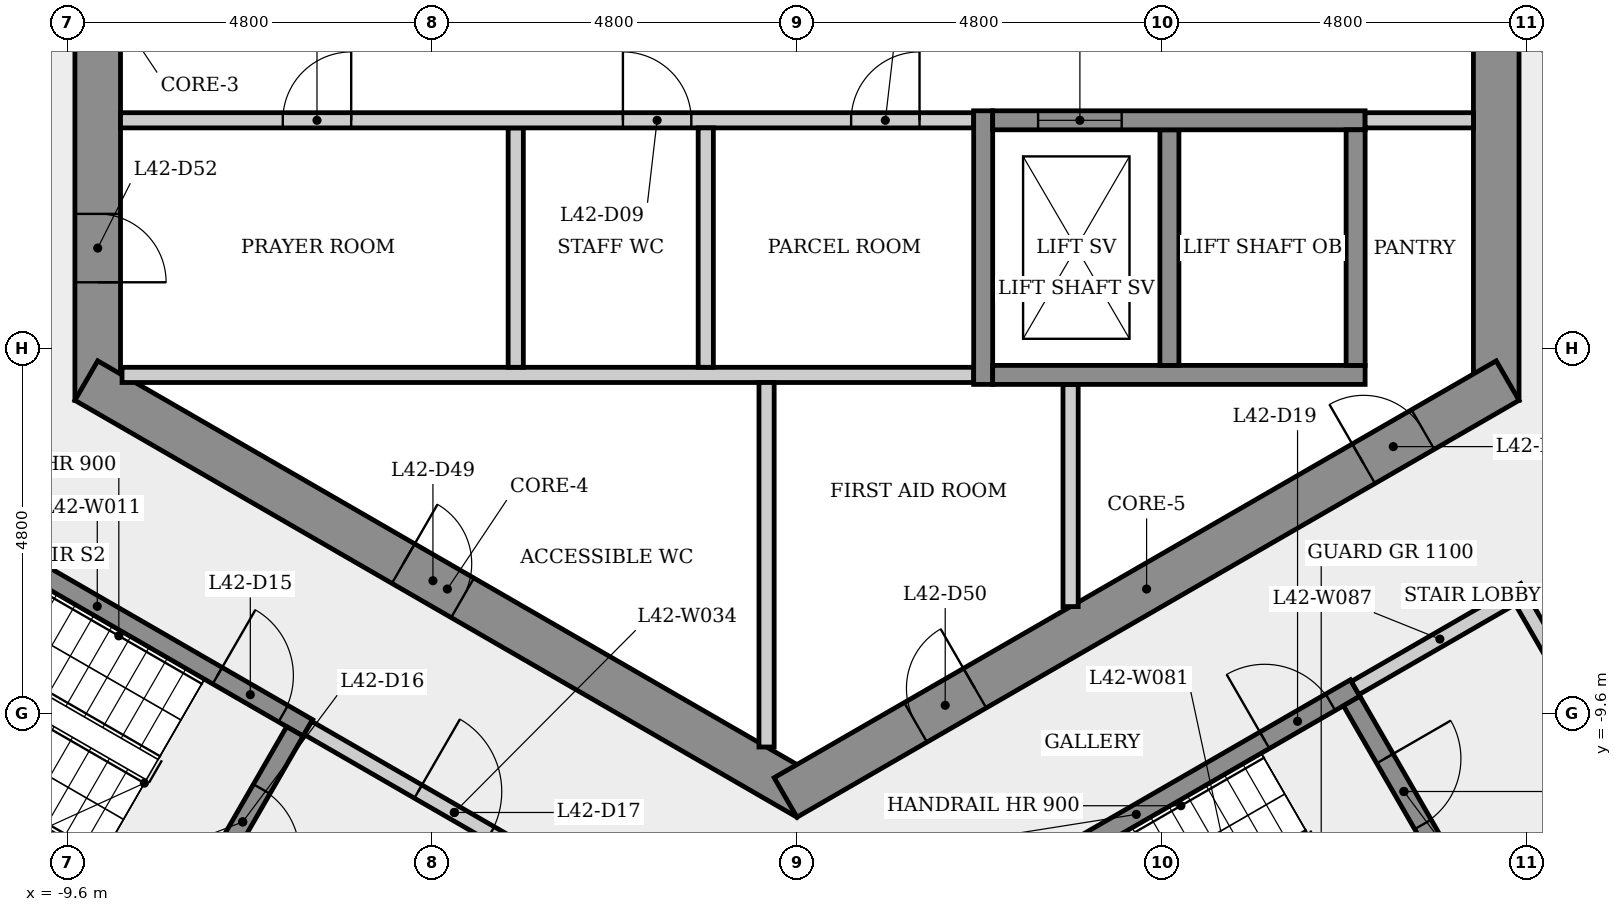
"""IFC4 building model, lengths in metres.
Left out: names, types, materials, properties, quantities, classifications, styles, units other than length and angle.
Written with IfcOpenShell. Run it as: python <this file> out.ifc"""

import sys

from ifc_helpers import new_model, si_unit, direction, frame, frame_2d, origin, place, context, subcontext, project, spatial, rectangle, extrude, element, fill, save


model = new_model("IFC4")
c1 = context("Model", 3, precision=1e-05, world=origin(), true_north=direction((0.0, 1.0)))
c2 = subcontext(c1, "Body", "Model", "MODEL_VIEW")
j1 = project(units=[si_unit("LENGTHUNIT", "METRE"), si_unit("PLANEANGLEUNIT", "RADIAN")], contexts=[c1])
p1 = place(None, origin())
s1 = spatial("IfcSite", under=j1, at=p1, CompositionType="ELEMENT")
p2 = place(p1, origin())
s2 = spatial("IfcBuilding", under=s1, at=p2, CompositionType="ELEMENT")
p3 = place(p2, frame((0.0, 0.0, 159.5)))
s3 = spatial("IfcBuildingStorey", under=s2, at=p3, CompositionType="ELEMENT", Elevation=159.5)
p4 = place(p3, frame((9.2, -5.485, 0.0), z_axis=(0.0, 0.0, 1.0), x_axis=(0.0, 1.0, 0.0)))
e1 = element("IfcWall", 1, at=p4, inside=s3, PredefinedType="SHEAR", context=c2, shape_type="SweptSolid", body=[
    extrude(rectangle(XDim=10.97, YDim=0.6, at=frame_2d((5.485, 0.0))), origin(), (0.0, 0.0, 1.0), 3.4),
])
p5 = place(p4, frame((4.685, 0.0, 0.0)))
e2 = element("IfcOpeningElement", 2, at=p5, cuts=e1, PredefinedType="OPENING", context=c2, shape_type="SweptSolid", body=[
    extrude(rectangle(XDim=1.6, YDim=2.1, at=frame_2d((0.8, 1.05))), frame((0.0, 0.31, 0.0), z_axis=(0.0, -1.0, 0.0), x_axis=(1.0, 0.0, 0.0)), (0.0, 0.0, 1.0), 0.62),
])
p6 = place(p3, frame((-9.2, 5.485, 0.0), z_axis=(0.0, 0.0, 1.0), x_axis=(0.0, -1.0, 0.0)))
e3 = element("IfcWall", 3, at=p6, inside=s3, PredefinedType="SHEAR", context=c2, shape_type="SweptSolid", body=[
    extrude(rectangle(XDim=10.97, YDim=0.6, at=frame_2d((5.485, 0.0))), origin(), (0.0, 0.0, 1.0), 3.4),
])
p7 = place(p6, frame((8.516, 0.0, 0.0)))
e4 = element("IfcOpeningElement", 4, at=p7, cuts=e3, PredefinedType="OPENING", context=c2, shape_type="SweptSolid", body=[
    extrude(rectangle(XDim=0.9, YDim=2.1, at=frame_2d((0.45, 1.05))), frame((0.0, 0.31, 0.0), z_axis=(0.0, -1.0, 0.0), x_axis=(1.0, 0.0, 0.0)), (0.0, 0.0, 1.0), 0.62),
])
p8 = place(p6, frame((4.685, 0.0, 0.0)))
e5 = element("IfcOpeningElement", 5, at=p8, cuts=e3, PredefinedType="OPENING", context=c2, shape_type="SweptSolid", body=[
    extrude(rectangle(XDim=1.6, YDim=2.1, at=frame_2d((0.8, 1.05))), frame((0.0, 0.31, 0.0), z_axis=(0.0, -1.0, 0.0), x_axis=(1.0, 0.0, 0.0)), (0.0, 0.0, 1.0), 0.62),
])
p9 = place(p3, frame((-9.35, -5.225, 0.0), z_axis=(0.0, 0.0, 1.0), x_axis=(0.866023993627, -0.500002442456, 0.0)))
e6 = element("IfcWall", 6, at=p9, inside=s3, PredefinedType="SHEAR", context=c2, shape_type="SweptSolid", body=[
    extrude(rectangle(XDim=10.97, YDim=0.6, at=frame_2d((5.485, 0.0))), origin(), (0.0, 0.0, 1.0), 3.4),
])
p10 = place(p9, frame((4.816, 0.0, 0.0)))
e7 = element("IfcOpeningElement", 7, at=p10, cuts=e6, PredefinedType="OPENING", context=c2, shape_type="SweptSolid", body=[
    extrude(rectangle(XDim=0.9, YDim=2.1, at=frame_2d((0.45, 1.05))), frame((0.0, 0.31, 0.0), z_axis=(0.0, -1.0, 0.0), x_axis=(1.0, 0.0, 0.0)), (0.0, 0.0, 1.0), 0.62),
])
p11 = place(p3, frame((-0.15, -10.71, 0.0), z_axis=(0.0, 0.0, 1.0), x_axis=(0.866023993627, 0.500002442456, 0.0)))
e8 = element("IfcWall", 8, at=p11, inside=s3, PredefinedType="SHEAR", context=c2, shape_type="SweptSolid", body=[
    extrude(rectangle(XDim=10.97, YDim=0.6, at=frame_2d((5.485, 0.0))), origin(), (0.0, 0.0, 1.0), 3.4),
])
p12 = place(p11, frame((1.975, 0.0, 0.0)))
e9 = element("IfcOpeningElement", 9, at=p12, cuts=e8, PredefinedType="OPENING", context=c2, shape_type="SweptSolid", body=[
    extrude(rectangle(XDim=0.9, YDim=2.1, at=frame_2d((0.45, 1.05))), frame((0.0, 0.31, 0.0), z_axis=(0.0, -1.0, 0.0), x_axis=(1.0, 0.0, 0.0)), (0.0, 0.0, 1.0), 0.62),
])
p13 = place(p11, frame((8.782, 0.0, 0.0)))
e10 = element("IfcOpeningElement", 10, at=p13, cuts=e8, PredefinedType="OPENING", context=c2, shape_type="SweptSolid", body=[
    extrude(rectangle(XDim=0.9, YDim=2.1, at=frame_2d((0.45, 1.05))), frame((0.0, 0.31, 0.0), z_axis=(0.0, -1.0, 0.0), x_axis=(1.0, 0.0, 0.0)), (0.0, 0.0, 1.0), 0.62),
])
p14 = place(p3, frame((-11.977, -6.595, 0.0), z_axis=(0.0, 0.0, 1.0), x_axis=(0.866025499775, -0.499999833739, 0.0)))
e11 = element("IfcWall", 11, at=p14, inside=s3, PredefinedType="SHEAR", context=c2, shape_type="SweptSolid", body=[
    extrude(rectangle(XDim=6.4, YDim=0.25, at=frame_2d((3.2, 0.0))), origin(), (0.0, 0.0, 1.0), 3.05),
])
p15 = place(p14, frame((5.025, 0.0, 0.0)))
e12 = element("IfcOpeningElement", 12, at=p15, cuts=e11, PredefinedType="OPENING", context=c2, shape_type="SweptSolid", body=[
    extrude(rectangle(XDim=1.0, YDim=2.1, at=frame_2d((0.5, 1.05))), frame((0.0, 0.135, 0.0), z_axis=(0.0, -1.0, 0.0), x_axis=(1.0, 0.0, 0.0)), (0.0, 0.0, 1.0), 0.27),
])
p16 = place(p3, frame((-13.477, -9.193, 0.0), z_axis=(0.0, 0.0, 1.0), x_axis=(0.866025499775, -0.499999833739, 0.0)))
e13 = element("IfcWall", 13, at=p16, inside=s3, PredefinedType="SHEAR", context=c2, shape_type="SweptSolid", body=[
    extrude(rectangle(XDim=6.4, YDim=0.25, at=frame_2d((3.2, 0.0))), origin(), (0.0, 0.0, 1.0), 3.05),
])
p17 = place(p3, frame((-8.88, -5.15, 0.0), z_axis=(0.0, 0.0, 1.0), x_axis=(1.0, 0.0, 0.0)))
e14 = element("IfcWall", 14, at=p17, inside=s3, PredefinedType="PARTITIONING", context=c2, shape_type="SweptSolid", body=[
    extrude(rectangle(XDim=11.205, YDim=0.2, at=frame_2d((5.603, 0.0))), origin(), (0.0, 0.0, 1.0), 3.05),
])
p18 = place(p3, frame((-6.605, -9.841, 0.0), z_axis=(0.0, 0.0, 1.0), x_axis=(-0.499996545922, -0.866027397988, 0.0)))
e15 = element("IfcWall", 15, at=p18, inside=s3, PredefinedType="SHEAR", context=c2, shape_type="SweptSolid", body=[
    extrude(rectangle(XDim=2.75, YDim=0.25, at=frame_2d((1.375, 0.0))), origin(), (0.0, 0.0, 1.0), 3.05),
])
p19 = place(p18, frame((0.875, 0.0, 0.0)))
e16 = element("IfcOpeningElement", 16, at=p19, cuts=e15, PredefinedType="OPENING", context=c2, shape_type="SweptSolid", body=[
    extrude(rectangle(XDim=1.0, YDim=2.1, at=frame_2d((0.5, 1.05))), frame((0.0, 0.135, 0.0), z_axis=(0.0, -1.0, 0.0), x_axis=(1.0, 0.0, 0.0)), (0.0, 0.0, 1.0), 0.27),
])
p20 = place(p3, frame((-6.435, -9.795, 0.0), z_axis=(0.0, 0.0, 1.0), x_axis=(0.866012907634, -0.500021643343, 0.0)))
e17 = element("IfcWall", 17, at=p20, inside=s3, PredefinedType="PARTITIONING", context=c2, shape_type="SweptSolid", body=[
    extrude(rectangle(XDim=4.45, YDim=0.2, at=frame_2d((2.225, 0.0))), origin(), (0.0, 0.0, 1.0), 3.05),
])
p21 = place(p20, frame((1.675, 0.0, 0.0)))
e18 = element("IfcOpeningElement", 18, at=p21, cuts=e17, PredefinedType="OPENING", context=c2, shape_type="SweptSolid", body=[
    extrude(rectangle(XDim=1.1, YDim=2.1, at=frame_2d((0.55, 1.05))), frame((0.0, 0.11, 0.0), z_axis=(0.0, -1.0, 0.0), x_axis=(1.0, 0.0, 0.0)), (0.0, 0.0, 1.0), 0.22),
])
p22 = place(p3, frame((-3.7, -1.9, 0.0), z_axis=(0.0, 0.0, 1.0), x_axis=(0.0, -1.0, 0.0)))
e19 = element("IfcWall", 19, at=p22, inside=s3, PredefinedType="PARTITIONING", context=c2, shape_type="SweptSolid", body=[
    extrude(rectangle(XDim=3.15, YDim=0.2, at=frame_2d((1.575, 0.0))), origin(), (0.0, 0.0, 1.0), 3.05),
])
p23 = place(p3, frame((-8.9, -1.8, 0.0), z_axis=(0.0, 0.0, 1.0), x_axis=(1.0, 0.0, 0.0)))
e20 = element("IfcWall", 20, at=p23, inside=s3, PredefinedType="PARTITIONING", context=c2, shape_type="SweptSolid", body=[
    extrude(rectangle(XDim=11.225, YDim=0.2, at=frame_2d((5.613, 0.0))), origin(), (0.0, 0.0, 1.0), 3.05),
])
p24 = place(p23, frame((2.135, 0.0, 0.0)))
e21 = element("IfcOpeningElement", 21, at=p24, cuts=e20, PredefinedType="OPENING", context=c2, shape_type="SweptSolid", body=[
    extrude(rectangle(XDim=0.9, YDim=2.1, at=frame_2d((0.45, 1.05))), frame((0.0, 0.11, 0.0), z_axis=(0.0, -1.0, 0.0), x_axis=(1.0, 0.0, 0.0)), (0.0, 0.0, 1.0), 0.22),
])
p25 = place(p23, frame((6.61, 0.0, 0.0)))
e22 = element("IfcOpeningElement", 22, at=p25, cuts=e20, PredefinedType="OPENING", context=c2, shape_type="SweptSolid", body=[
    extrude(rectangle(XDim=0.9, YDim=2.1, at=frame_2d((0.45, 1.05))), frame((0.0, 0.11, 0.0), z_axis=(0.0, -1.0, 0.0), x_axis=(1.0, 0.0, 0.0)), (0.0, 0.0, 1.0), 0.22),
])
p26 = place(p23, frame((9.613, 0.0, 0.0)))
e23 = element("IfcOpeningElement", 23, at=p26, cuts=e20, PredefinedType="OPENING", context=c2, shape_type="SweptSolid", body=[
    extrude(rectangle(XDim=0.9, YDim=2.1, at=frame_2d((0.45, 1.05))), frame((0.0, 0.11, 0.0), z_axis=(0.0, -1.0, 0.0), x_axis=(1.0, 0.0, 0.0)), (0.0, 0.0, 1.0), 0.22),
])
p27 = place(p3, frame((-1.2, -1.9, 0.0), z_axis=(0.0, 0.0, 1.0), x_axis=(0.0, -1.0, 0.0)))
e24 = element("IfcWall", 24, at=p27, inside=s3, PredefinedType="PARTITIONING", context=c2, shape_type="SweptSolid", body=[
    extrude(rectangle(XDim=3.15, YDim=0.2, at=frame_2d((1.575, 0.0))), origin(), (0.0, 0.0, 1.0), 3.05),
])
p28 = place(p3, frame((-0.4, -5.25, 0.0), z_axis=(0.0, 0.0, 1.0), x_axis=(0.0, -1.0, 0.0)))
e25 = element("IfcWall", 25, at=p28, inside=s3, PredefinedType="PARTITIONING", context=c2, shape_type="SweptSolid", body=[
    extrude(rectangle(XDim=4.796, YDim=0.2, at=frame_2d((2.398, 0.0))), origin(), (0.0, 0.0, 1.0), 3.05),
])
p29 = place(p3, frame((1.585, -12.595, 0.0), z_axis=(0.0, 0.0, 1.0), x_axis=(0.866036417653, 0.499980922934, 0.0)))
e26 = element("IfcWall", 26, at=p29, inside=s3, PredefinedType="SHEAR", context=c2, shape_type="SweptSolid", body=[
    extrude(rectangle(XDim=6.65, YDim=0.25, at=frame_2d((3.325, 0.0))), origin(), (0.0, 0.0, 1.0), 3.05),
])
p30 = place(p29, frame((5.275, 0.0, 0.0)))
e27 = element("IfcOpeningElement", 27, at=p30, cuts=e26, PredefinedType="OPENING", context=c2, shape_type="SweptSolid", body=[
    extrude(rectangle(XDim=1.0, YDim=2.1, at=frame_2d((0.5, 1.05))), frame((0.0, 0.135, 0.0), z_axis=(0.0, -1.0, 0.0), x_axis=(1.0, 0.0, 0.0)), (0.0, 0.0, 1.0), 0.27),
])
p31 = place(p3, frame((2.45, -5.275, 0.0), z_axis=(0.0, 0.0, 1.0), x_axis=(0.0, 1.0, 0.0)))
e28 = element("IfcWall", 28, at=p31, inside=s3, PredefinedType="SHEAR", context=c2, shape_type="SweptSolid", body=[
    extrude(rectangle(XDim=3.6, YDim=0.25, at=frame_2d((1.8, 0.0))), origin(), (0.0, 0.0, 1.0), 3.05),
])
p32 = place(p3, frame((3.6, -5.275, 0.0), z_axis=(0.0, 0.0, 1.0), x_axis=(0.0, -1.0, 0.0)))
e29 = element("IfcWall", 29, at=p32, inside=s3, PredefinedType="PARTITIONING", context=c2, shape_type="SweptSolid", body=[
    extrude(rectangle(XDim=2.924, YDim=0.2, at=frame_2d((1.462, 0.0))), origin(), (0.0, 0.0, 1.0), 3.05),
])
p33 = place(p3, frame((2.575, -5.15, 0.0), z_axis=(0.0, 0.0, 1.0), x_axis=(1.0, 0.0, 0.0)))
e30 = element("IfcWall", 30, at=p33, inside=s3, PredefinedType="SHEAR", context=c2, shape_type="SweptSolid", body=[
    extrude(rectangle(XDim=4.9, YDim=0.25, at=frame_2d((2.45, 0.0))), origin(), (0.0, 0.0, 1.0), 3.05),
])
p34 = place(p3, frame((4.9, -1.925, 0.0), z_axis=(0.0, 0.0, 1.0), x_axis=(0.0, -1.0, 0.0)))
e31 = element("IfcWall", 31, at=p34, inside=s3, PredefinedType="SHEAR", context=c2, shape_type="SweptSolid", body=[
    extrude(rectangle(XDim=3.1, YDim=0.25, at=frame_2d((1.55, 0.0))), origin(), (0.0, 0.0, 1.0), 3.4),
])
p35 = place(p3, frame((2.575, -1.8, 0.0), z_axis=(0.0, 0.0, 1.0), x_axis=(1.0, 0.0, 0.0)))
e32 = element("IfcWall", 32, at=p35, inside=s3, PredefinedType="SHEAR", context=c2, shape_type="SweptSolid", body=[
    extrude(rectangle(XDim=4.9, YDim=0.25, at=frame_2d((2.45, 0.0))), origin(), (0.0, 0.0, 1.0), 3.05),
])
p36 = place(p35, frame((0.597, 0.0, 0.0)))
e33 = element("IfcOpeningElement", 33, at=p36, cuts=e32, PredefinedType="OPENING", context=c2, shape_type="SweptSolid", body=[
    extrude(rectangle(XDim=1.1, YDim=2.1, at=frame_2d((0.55, 1.05))), frame((0.0, 0.135, 0.0), z_axis=(0.0, -1.0, 0.0), x_axis=(1.0, 0.0, 0.0)), (0.0, 0.0, 1.0), 0.27),
])
p37 = place(p3, frame((7.298, -9.441, 0.0), z_axis=(0.0, 0.0, 1.0), x_axis=(0.500034990121, -0.866005201286, 0.0)))
e34 = element("IfcWall", 34, at=p37, inside=s3, PredefinedType="SHEAR", context=c2, shape_type="SweptSolid", body=[
    extrude(rectangle(XDim=2.75, YDim=0.25, at=frame_2d((1.375, 0.0))), origin(), (0.0, 0.0, 1.0), 3.05),
])
p38 = place(p37, frame((0.875, 0.0, 0.0)))
e35 = element("IfcOpeningElement", 35, at=p38, cuts=e34, PredefinedType="OPENING", context=c2, shape_type="SweptSolid", body=[
    extrude(rectangle(XDim=1.0, YDim=2.1, at=frame_2d((0.5, 1.05))), frame((0.0, 0.135, 0.0), z_axis=(0.0, -1.0, 0.0), x_axis=(1.0, 0.0, 0.0)), (0.0, 0.0, 1.0), 0.27),
])
p39 = place(p3, frame((7.344, -9.27, 0.0), z_axis=(0.0, 0.0, 1.0), x_axis=(0.866005588531, 0.500034319456, 0.0)))
e36 = element("IfcWall", 36, at=p39, inside=s3, PredefinedType="PARTITIONING", context=c2, shape_type="SweptSolid", body=[
    extrude(rectangle(XDim=2.575, YDim=0.2, at=frame_2d((1.288, 0.0))), origin(), (0.0, 0.0, 1.0), 3.05),
])
p40 = place(p3, frame((7.35, -1.925, 0.0), z_axis=(0.0, 0.0, 1.0), x_axis=(0.0, -1.0, 0.0)))
e37 = element("IfcWall", 37, at=p40, inside=s3, PredefinedType="SHEAR", context=c2, shape_type="SweptSolid", body=[
    extrude(rectangle(XDim=3.1, YDim=0.25, at=frame_2d((1.55, 0.0))), origin(), (0.0, 0.0, 1.0), 3.4),
])
p41 = place(p3, frame((8.9, -1.8, 0.0), z_axis=(0.0, 0.0, 1.0), x_axis=(-1.0, 0.0, 0.0)))
e38 = element("IfcWall", 38, at=p41, inside=s3, PredefinedType="PARTITIONING", context=c2, shape_type="SweptSolid", body=[
    extrude(rectangle(XDim=1.425, YDim=0.2, at=frame_2d((0.712, 0.0))), origin(), (0.0, 0.0, 1.0), 3.05),
])
p42 = place(p3, frame((9.537, -8.119, 0.0), z_axis=(0.0, 0.0, 1.0), x_axis=(0.499990139034, -0.866031096941, 0.0)))
e39 = element("IfcWall", 39, at=p42, inside=s3, PredefinedType="PARTITIONING", context=c2, shape_type="SweptSolid", body=[
    extrude(rectangle(XDim=3.0, YDim=0.2, at=frame_2d((1.5, 0.0))), origin(), (0.0, 0.0, 1.0), 3.05),
])
p43 = place(p42, frame((0.935, 0.0, 0.0)))
e40 = element("IfcOpeningElement", 40, at=p43, cuts=e39, PredefinedType="OPENING", context=c2, shape_type="SweptSolid", body=[
    extrude(rectangle(XDim=1.0, YDim=2.1, at=frame_2d((0.5, 1.05))), frame((0.0, 0.11, 0.0), z_axis=(0.0, -1.0, 0.0), x_axis=(1.0, 0.0, 0.0)), (0.0, 0.0, 1.0), 0.22),
])
p44 = place(p3, frame((10.901, -10.681, 0.0), z_axis=(0.0, 0.0, 1.0), x_axis=(-0.866007538022, -0.500030943131, 0.0)))
e41 = element("IfcWall", 41, at=p44, inside=s3, PredefinedType="PARTITIONING", context=c2, shape_type="SweptSolid", body=[
    extrude(rectangle(XDim=2.375, YDim=0.2, at=frame_2d((1.188, 0.0))), origin(), (0.0, 0.0, 1.0), 3.05),
])
p45 = place(p36, origin())
e42 = element("IfcDoor", 42, at=p45, inside=s3, OperationType="SLIDING_TO_LEFT", PredefinedType="DOOR", context=c2, shape_type="SweptSolid", body=[
    extrude(rectangle(XDim=1.1, YDim=2.1, at=frame_2d((0.55, 1.05))), frame((0.0, 0.025, 0.0), z_axis=(0.0, -1.0, 0.0), x_axis=(1.0, 0.0, 0.0)), (0.0, 0.0, 1.0), 0.05),
])
fill(e33, e42)
p46 = place(p24, origin())
e43 = element("IfcDoor", 43, at=p46, inside=s3, OperationType="SINGLE_SWING_RIGHT", PredefinedType="DOOR", context=c2, shape_type="SweptSolid", body=[
    extrude(rectangle(XDim=0.9, YDim=2.1, at=frame_2d((0.45, 1.05))), frame((0.0, 0.025, 0.0), z_axis=(0.0, -1.0, 0.0), x_axis=(1.0, 0.0, 0.0)), (0.0, 0.0, 1.0), 0.05),
])
fill(e21, e43)
p47 = place(p25, origin())
e44 = element("IfcDoor", 44, at=p47, inside=s3, OperationType="SINGLE_SWING_LEFT", PredefinedType="DOOR", context=c2, shape_type="SweptSolid", body=[
    extrude(rectangle(XDim=0.9, YDim=2.1, at=frame_2d((0.45, 1.05))), frame((0.0, 0.025, 0.0), z_axis=(0.0, -1.0, 0.0), x_axis=(1.0, 0.0, 0.0)), (0.0, 0.0, 1.0), 0.05),
])
fill(e22, e44)
p48 = place(p26, origin())
e45 = element("IfcDoor", 45, at=p48, inside=s3, OperationType="SINGLE_SWING_RIGHT", PredefinedType="DOOR", context=c2, shape_type="SweptSolid", body=[
    extrude(rectangle(XDim=0.9, YDim=2.1, at=frame_2d((0.45, 1.05))), frame((0.0, 0.025, 0.0), z_axis=(0.0, -1.0, 0.0), x_axis=(1.0, 0.0, 0.0)), (0.0, 0.0, 1.0), 0.05),
])
fill(e23, e45)
p49 = place(p15, origin())
e46 = element("IfcDoor", 46, at=p49, inside=s3, OperationType="SINGLE_SWING_LEFT", PredefinedType="DOOR", context=c2, shape_type="SweptSolid", body=[
    extrude(rectangle(XDim=1.0, YDim=2.1, at=frame_2d((0.5, 1.05))), frame((0.0, 0.025, 0.0), z_axis=(0.0, -1.0, 0.0), x_axis=(1.0, 0.0, 0.0)), (0.0, 0.0, 1.0), 0.05),
])
fill(e12, e46)
p50 = place(p19, origin())
e47 = element("IfcDoor", 47, at=p50, inside=s3, OperationType="SINGLE_SWING_RIGHT", PredefinedType="DOOR", context=c2, shape_type="SweptSolid", body=[
    extrude(rectangle(XDim=1.0, YDim=2.1, at=frame_2d((0.5, 1.05))), frame((0.0, 0.025, 0.0), z_axis=(0.0, -1.0, 0.0), x_axis=(1.0, 0.0, 0.0)), (0.0, 0.0, 1.0), 0.05),
])
fill(e16, e47)
p51 = place(p21, origin())
e48 = element("IfcDoor", 48, at=p51, inside=s3, OperationType="SINGLE_SWING_LEFT", PredefinedType="DOOR", context=c2, shape_type="SweptSolid", body=[
    extrude(rectangle(XDim=1.1, YDim=2.1, at=frame_2d((0.55, 1.05))), frame((0.0, 0.025, 0.0), z_axis=(0.0, -1.0, 0.0), x_axis=(1.0, 0.0, 0.0)), (0.0, 0.0, 1.0), 0.05),
])
fill(e18, e48)
p52 = place(p30, origin())
e49 = element("IfcDoor", 49, at=p52, inside=s3, OperationType="SINGLE_SWING_LEFT", PredefinedType="DOOR", context=c2, shape_type="SweptSolid", body=[
    extrude(rectangle(XDim=1.0, YDim=2.1, at=frame_2d((0.5, 1.05))), frame((0.0, 0.025, 0.0), z_axis=(0.0, -1.0, 0.0), x_axis=(1.0, 0.0, 0.0)), (0.0, 0.0, 1.0), 0.05),
])
fill(e27, e49)
p53 = place(p38, origin())
e50 = element("IfcDoor", 50, at=p53, inside=s3, OperationType="SINGLE_SWING_LEFT", PredefinedType="DOOR", context=c2, shape_type="SweptSolid", body=[
    extrude(rectangle(XDim=1.0, YDim=2.1, at=frame_2d((0.5, 1.05))), frame((0.0, 0.025, 0.0), z_axis=(0.0, -1.0, 0.0), x_axis=(1.0, 0.0, 0.0)), (0.0, 0.0, 1.0), 0.05),
])
fill(e35, e50)
p54 = place(p10, origin())
e51 = element("IfcDoor", 51, at=p54, inside=s3, OperationType="SINGLE_SWING_LEFT", PredefinedType="DOOR", context=c2, shape_type="SweptSolid", body=[
    extrude(rectangle(XDim=0.9, YDim=2.1, at=frame_2d((0.45, 1.05))), frame((0.0, 0.025, 0.0), z_axis=(0.0, -1.0, 0.0), x_axis=(1.0, 0.0, 0.0)), (0.0, 0.0, 1.0), 0.05),
])
fill(e7, e51)
p55 = place(p12, origin())
e52 = element("IfcDoor", 52, at=p55, inside=s3, OperationType="SINGLE_SWING_RIGHT", PredefinedType="DOOR", context=c2, shape_type="SweptSolid", body=[
    extrude(rectangle(XDim=0.9, YDim=2.1, at=frame_2d((0.45, 1.05))), frame((0.0, 0.025, 0.0), z_axis=(0.0, -1.0, 0.0), x_axis=(1.0, 0.0, 0.0)), (0.0, 0.0, 1.0), 0.05),
])
fill(e9, e52)
p56 = place(p13, origin())
e53 = element("IfcDoor", 53, at=p56, inside=s3, OperationType="SINGLE_SWING_LEFT", PredefinedType="DOOR", context=c2, shape_type="SweptSolid", body=[
    extrude(rectangle(XDim=0.9, YDim=2.1, at=frame_2d((0.45, 1.05))), frame((0.0, 0.025, 0.0), z_axis=(0.0, -1.0, 0.0), x_axis=(1.0, 0.0, 0.0)), (0.0, 0.0, 1.0), 0.05),
])
fill(e10, e53)
p57 = place(p7, origin())
e54 = element("IfcDoor", 54, at=p57, inside=s3, OperationType="SINGLE_SWING_RIGHT", PredefinedType="DOOR", context=c2, shape_type="SweptSolid", body=[
    extrude(rectangle(XDim=0.9, YDim=2.1, at=frame_2d((0.45, 1.05))), frame((0.0, 0.025, 0.0), z_axis=(0.0, -1.0, 0.0), x_axis=(1.0, 0.0, 0.0)), (0.0, 0.0, 1.0), 0.05),
])
fill(e4, e54)
save(model, sys.argv[1])
